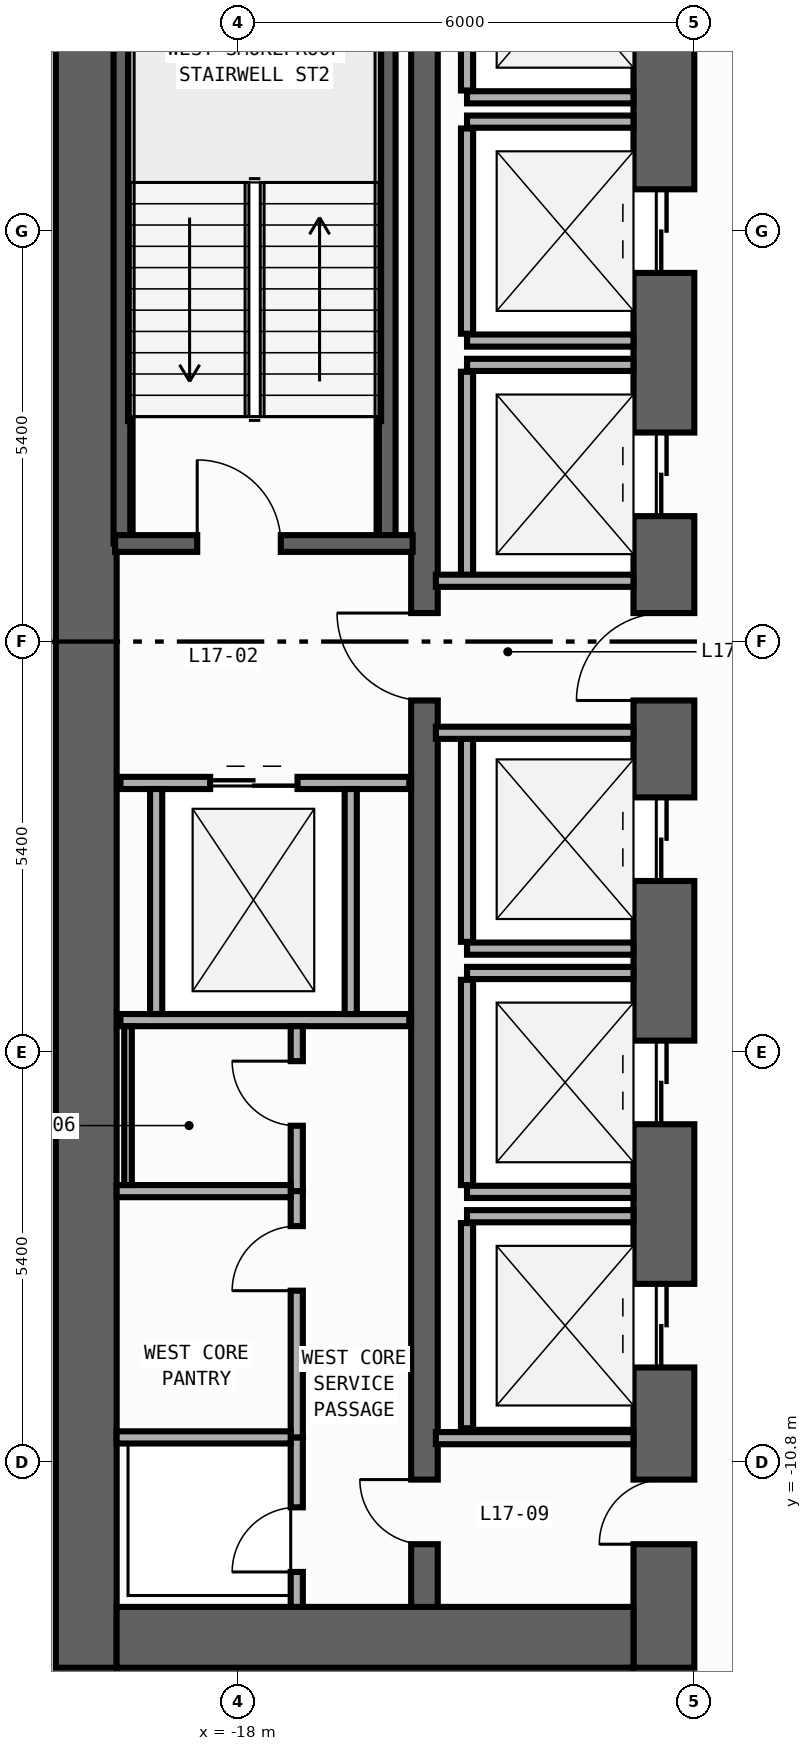
"""IFC4 building model, lengths in metres.
Left out: names, types, materials, properties, quantities, classifications, styles, units other than length and angle.
Written with IfcOpenShell. Run it as: python <this file> out.ifc"""

import sys

from ifc_helpers import new_model, si_unit, direction, frame, frame_2d, origin, place, context, subcontext, project, spatial, rectangle, extrude, element, fill, save


model = new_model("IFC4")
c1 = context("Model", 3, precision=1e-05, world=origin(), true_north=direction((0.0, 1.0)))
c2 = subcontext(c1, "Body", "Model", "MODEL_VIEW")
j1 = project(units=[si_unit("LENGTHUNIT", "METRE"), si_unit("PLANEANGLEUNIT", "RADIAN")], contexts=[c1])
p1 = place(None, origin())
s1 = spatial("IfcSite", under=j1, at=p1, CompositionType="ELEMENT")
p2 = place(p1, origin())
s2 = spatial("IfcBuilding", under=s1, at=p2, CompositionType="ELEMENT")
p3 = place(p2, frame((0.0, 0.0, 72.2)))
s3 = spatial("IfcBuildingStorey", under=s2, at=p3, CompositionType="ELEMENT", Elevation=72.2)
p4 = place(p3, frame((-20.0, -13.5, 0.0), z_axis=(0.0, 0.0, 1.0), x_axis=(0.0, 1.0, 0.0)))
e1 = element("IfcWall", 1, at=p4, inside=s3, PredefinedType="SHEAR", context=c2, shape_type="SweptSolid", body=[
    extrude(rectangle(XDim=27.0, YDim=0.8, at=frame_2d((13.5, 0.0))), origin(), (0.0, 0.0, 1.0), 3.94),
])
p5 = place(p3, frame((-12.4, -13.5, 0.0), z_axis=(0.0, 0.0, 1.0), x_axis=(0.0, 1.0, 0.0)))
e2 = element("IfcWall", 2, at=p5, inside=s3, PredefinedType="SHEAR", context=c2, shape_type="SweptSolid", body=[
    extrude(rectangle(XDim=27.0, YDim=0.8, at=frame_2d((13.5, 0.0))), origin(), (0.0, 0.0, 1.0), 3.94),
])
p6 = place(p5, frame((21.55, 0.0, 0.0)))
e3 = element("IfcOpeningElement", 3, at=p6, cuts=e2, PredefinedType="OPENING", context=c2, shape_type="SweptSolid", body=[
    extrude(rectangle(XDim=1.1, YDim=2.2, at=frame_2d((0.55, 1.1))), frame((0.0, 0.41, 0.0), z_axis=(0.0, -1.0, 0.0), x_axis=(1.0, 0.0, 0.0)), (0.0, 0.0, 1.0), 0.82),
])
p7 = place(p5, frame((18.35, 0.0, 0.0)))
e4 = element("IfcOpeningElement", 4, at=p7, cuts=e2, PredefinedType="OPENING", context=c2, shape_type="SweptSolid", body=[
    extrude(rectangle(XDim=1.1, YDim=2.2, at=frame_2d((0.55, 1.1))), frame((0.0, 0.41, 0.0), z_axis=(0.0, -1.0, 0.0), x_axis=(1.0, 0.0, 0.0)), (0.0, 0.0, 1.0), 0.82),
])
p8 = place(p5, frame((15.15, 0.0, 0.0)))
e5 = element("IfcOpeningElement", 5, at=p8, cuts=e2, PredefinedType="OPENING", context=c2, shape_type="SweptSolid", body=[
    extrude(rectangle(XDim=1.1, YDim=2.2, at=frame_2d((0.55, 1.1))), frame((0.0, 0.41, 0.0), z_axis=(0.0, -1.0, 0.0), x_axis=(1.0, 0.0, 0.0)), (0.0, 0.0, 1.0), 0.82),
])
p9 = place(p5, frame((10.35, 0.0, 0.0)))
e6 = element("IfcOpeningElement", 6, at=p9, cuts=e2, PredefinedType="OPENING", context=c2, shape_type="SweptSolid", body=[
    extrude(rectangle(XDim=1.1, YDim=2.2, at=frame_2d((0.55, 1.1))), frame((0.0, 0.41, 0.0), z_axis=(0.0, -1.0, 0.0), x_axis=(1.0, 0.0, 0.0)), (0.0, 0.0, 1.0), 0.82),
])
p10 = place(p5, frame((7.15, 0.0, 0.0)))
e7 = element("IfcOpeningElement", 7, at=p10, cuts=e2, PredefinedType="OPENING", context=c2, shape_type="SweptSolid", body=[
    extrude(rectangle(XDim=1.1, YDim=2.2, at=frame_2d((0.55, 1.1))), frame((0.0, 0.41, 0.0), z_axis=(0.0, -1.0, 0.0), x_axis=(1.0, 0.0, 0.0)), (0.0, 0.0, 1.0), 0.82),
])
p11 = place(p5, frame((3.95, 0.0, 0.0)))
e8 = element("IfcOpeningElement", 8, at=p11, cuts=e2, PredefinedType="OPENING", context=c2, shape_type="SweptSolid", body=[
    extrude(rectangle(XDim=1.1, YDim=2.2, at=frame_2d((0.55, 1.1))), frame((0.0, 0.41, 0.0), z_axis=(0.0, -1.0, 0.0), x_axis=(1.0, 0.0, 0.0)), (0.0, 0.0, 1.0), 0.82),
])
p12 = place(p5, frame((12.725, 0.0, 0.0)))
e9 = element("IfcOpeningElement", 9, at=p12, cuts=e2, PredefinedType="OPENING", context=c2, shape_type="SweptSolid", body=[
    extrude(rectangle(XDim=1.15, YDim=2.2, at=frame_2d((0.575, 1.1))), frame((0.0, 0.41, 0.0), z_axis=(0.0, -1.0, 0.0), x_axis=(1.0, 0.0, 0.0)), (0.0, 0.0, 1.0), 0.82),
])
p13 = place(p5, frame((1.625, 0.0, 0.0)))
e10 = element("IfcOpeningElement", 10, at=p13, cuts=e2, PredefinedType="OPENING", context=c2, shape_type="SweptSolid", body=[
    extrude(rectangle(XDim=0.85, YDim=2.1, at=frame_2d((0.425, 1.05))), frame((0.0, 0.41, 0.0), z_axis=(0.0, -1.0, 0.0), x_axis=(1.0, 0.0, 0.0)), (0.0, 0.0, 1.0), 0.82),
])
p14 = place(p3, frame((-19.6, -13.1, 0.0), z_axis=(0.0, 0.0, 1.0), x_axis=(1.0, 0.0, 0.0)))
e11 = element("IfcWall", 11, at=p14, inside=s3, PredefinedType="SHEAR", context=c2, shape_type="SweptSolid", body=[
    extrude(rectangle(XDim=6.8, YDim=0.8, at=frame_2d((3.4, 0.0))), origin(), (0.0, 0.0, 1.0), 3.94),
])
p15 = place(p3, frame((-15.55, -12.7, 0.0), z_axis=(0.0, 0.0, 1.0), x_axis=(0.0, 1.0, 0.0)))
e12 = element("IfcWall", 12, at=p15, inside=s3, PredefinedType="SHEAR", context=c2, shape_type="SweptSolid", body=[
    extrude(rectangle(XDim=25.4, YDim=0.35, at=frame_2d((12.7, 0.0))), origin(), (0.0, 0.0, 1.0), 3.94),
])
p16 = place(p15, frame((11.925, 0.0, 0.0)))
e13 = element("IfcOpeningElement", 13, at=p16, cuts=e12, PredefinedType="OPENING", context=c2, shape_type="SweptSolid", body=[
    extrude(rectangle(XDim=1.15, YDim=2.2, at=frame_2d((0.575, 1.1))), frame((0.0, 0.185, 0.0), z_axis=(0.0, -1.0, 0.0), x_axis=(1.0, 0.0, 0.0)), (0.0, 0.0, 1.0), 0.37),
])
p17 = place(p15, frame((0.825, 0.0, 0.0)))
e14 = element("IfcOpeningElement", 14, at=p17, cuts=e12, PredefinedType="OPENING", context=c2, shape_type="SweptSolid", body=[
    extrude(rectangle(XDim=0.85, YDim=2.1, at=frame_2d((0.425, 1.05))), frame((0.0, 0.185, 0.0), z_axis=(0.0, -1.0, 0.0), x_axis=(1.0, 0.0, 0.0)), (0.0, 0.0, 1.0), 0.37),
])
for number, where, z_axis, x_axis in (
    (15, (-16.04, 1.29, 0.0), (0.0, 0.0, 1.0), (0.0, 1.0, 0.0)),
    (16, (-19.53, 1.29, 0.0), (0.0, 0.0, 1.0), (0.0, 1.0, 0.0)),
):
    element("IfcWall", number, at=place(p3, frame(where, z_axis=z_axis, x_axis=x_axis)), inside=s3, PredefinedType="SHEAR", context=c2, shape_type="SweptSolid", body=[
        extrude(rectangle(XDim=11.3, YDim=0.22, at=frame_2d((5.65, 0.0))), origin(), (0.0, 0.0, 1.0), 3.94),
    ])
p18 = place(p3, frame((-19.62, 1.29, 0.0), z_axis=(0.0, 0.0, 1.0), x_axis=(1.0, 0.0, 0.0)))
e17 = element("IfcWall", 17, at=p18, inside=s3, PredefinedType="SHEAR", context=c2, shape_type="SweptSolid", body=[
    extrude(rectangle(XDim=3.915, YDim=0.22, at=frame_2d((1.958, 0.0))), origin(), (0.0, 0.0, 1.0), 3.94),
])
p19 = place(p18, frame((1.08, 0.0, 0.0)))
e18 = element("IfcOpeningElement", 18, at=p19, cuts=e17, PredefinedType="OPENING", context=c2, shape_type="SweptSolid", body=[
    extrude(rectangle(XDim=1.1, YDim=2.2, at=frame_2d((0.55, 1.1))), frame((0.0, 0.12, 0.0), z_axis=(0.0, -1.0, 0.0), x_axis=(1.0, 0.0, 0.0)), (0.0, 0.0, 1.0), 0.24),
])
p20 = place(p3, frame((-14.99, 7.16, 0.0), z_axis=(0.0, 0.0, 1.0), x_axis=(1.0, 0.0, 0.0)))
e19 = element("IfcWall", 19, at=p20, inside=s3, PredefinedType="STANDARD", context=c2, shape_type="SweptSolid", body=[
    extrude(rectangle(XDim=2.19, YDim=0.16, at=frame_2d((1.095, 0.0))), origin(), (0.0, 0.0, 1.0), 3.94),
])
p21 = place(p3, frame((-14.99, 7.25, 0.0), z_axis=(0.0, 0.0, 1.0), x_axis=(0.0, 1.0, 0.0)))
e20 = element("IfcWall", 20, at=p21, inside=s3, PredefinedType="STANDARD", context=c2, shape_type="SweptSolid", body=[
    extrude(rectangle(XDim=2.7, YDim=0.16, at=frame_2d((1.35, 0.0))), origin(), (0.0, 0.0, 1.0), 3.94),
])
for number, where, z_axis, x_axis in (
    (21, (-14.99, 3.96, 0.0), (0.0, 0.0, 1.0), (1.0, 0.0, 0.0)),
    (22, (-14.99, 6.84, 0.0), (0.0, 0.0, 1.0), (1.0, 0.0, 0.0)),
):
    element("IfcWall", number, at=place(p3, frame(where, z_axis=z_axis, x_axis=x_axis)), inside=s3, PredefinedType="STANDARD", context=c2, shape_type="SweptSolid", body=[
        extrude(rectangle(XDim=2.19, YDim=0.16, at=frame_2d((1.095, 0.0))), origin(), (0.0, 0.0, 1.0), 3.94),
    ])
p22 = place(p3, frame((-14.99, 4.05, 0.0), z_axis=(0.0, 0.0, 1.0), x_axis=(0.0, 1.0, 0.0)))
e23 = element("IfcWall", 23, at=p22, inside=s3, PredefinedType="STANDARD", context=c2, shape_type="SweptSolid", body=[
    extrude(rectangle(XDim=2.7, YDim=0.16, at=frame_2d((1.35, 0.0))), origin(), (0.0, 0.0, 1.0), 3.94),
])
p23 = place(p3, frame((-14.99, 3.64, 0.0), z_axis=(0.0, 0.0, 1.0), x_axis=(1.0, 0.0, 0.0)))
e24 = element("IfcWall", 24, at=p23, inside=s3, PredefinedType="STANDARD", context=c2, shape_type="SweptSolid", body=[
    extrude(rectangle(XDim=2.19, YDim=0.16, at=frame_2d((1.095, 0.0))), origin(), (0.0, 0.0, 1.0), 3.94),
])
p24 = place(p3, frame((-14.99, 0.85, 0.0), z_axis=(0.0, 0.0, 1.0), x_axis=(0.0, 1.0, 0.0)))
e25 = element("IfcWall", 25, at=p24, inside=s3, PredefinedType="STANDARD", context=c2, shape_type="SweptSolid", body=[
    extrude(rectangle(XDim=2.7, YDim=0.16, at=frame_2d((1.35, 0.0))), origin(), (0.0, 0.0, 1.0), 3.94),
])
p25 = place(p3, frame((-14.99, -4.04, 0.0), z_axis=(0.0, 0.0, 1.0), x_axis=(1.0, 0.0, 0.0)))
e26 = element("IfcWall", 26, at=p25, inside=s3, PredefinedType="STANDARD", context=c2, shape_type="SweptSolid", body=[
    extrude(rectangle(XDim=2.19, YDim=0.16, at=frame_2d((1.095, 0.0))), origin(), (0.0, 0.0, 1.0), 3.94),
])
p26 = place(p3, frame((-14.99, -3.95, 0.0), z_axis=(0.0, 0.0, 1.0), x_axis=(0.0, 1.0, 0.0)))
e27 = element("IfcWall", 27, at=p26, inside=s3, PredefinedType="STANDARD", context=c2, shape_type="SweptSolid", body=[
    extrude(rectangle(XDim=2.7, YDim=0.16, at=frame_2d((1.35, 0.0))), origin(), (0.0, 0.0, 1.0), 3.94),
])
for number, where, z_axis, x_axis in (
    (28, (-14.99, -7.24, 0.0), (0.0, 0.0, 1.0), (1.0, 0.0, 0.0)),
    (29, (-14.99, -4.36, 0.0), (0.0, 0.0, 1.0), (1.0, 0.0, 0.0)),
):
    element("IfcWall", number, at=place(p3, frame(where, z_axis=z_axis, x_axis=x_axis)), inside=s3, PredefinedType="STANDARD", context=c2, shape_type="SweptSolid", body=[
        extrude(rectangle(XDim=2.19, YDim=0.16, at=frame_2d((1.095, 0.0))), origin(), (0.0, 0.0, 1.0), 3.94),
    ])
p27 = place(p3, frame((-14.99, -7.15, 0.0), z_axis=(0.0, 0.0, 1.0), x_axis=(0.0, 1.0, 0.0)))
e30 = element("IfcWall", 30, at=p27, inside=s3, PredefinedType="STANDARD", context=c2, shape_type="SweptSolid", body=[
    extrude(rectangle(XDim=2.7, YDim=0.16, at=frame_2d((1.35, 0.0))), origin(), (0.0, 0.0, 1.0), 3.94),
])
p28 = place(p3, frame((-14.99, -7.56, 0.0), z_axis=(0.0, 0.0, 1.0), x_axis=(1.0, 0.0, 0.0)))
e31 = element("IfcWall", 31, at=p28, inside=s3, PredefinedType="STANDARD", context=c2, shape_type="SweptSolid", body=[
    extrude(rectangle(XDim=2.19, YDim=0.16, at=frame_2d((1.095, 0.0))), origin(), (0.0, 0.0, 1.0), 3.94),
])
p29 = place(p3, frame((-14.99, -10.35, 0.0), z_axis=(0.0, 0.0, 1.0), x_axis=(0.0, 1.0, 0.0)))
e32 = element("IfcWall", 32, at=p29, inside=s3, PredefinedType="STANDARD", context=c2, shape_type="SweptSolid", body=[
    extrude(rectangle(XDim=2.7, YDim=0.16, at=frame_2d((1.35, 0.0))), origin(), (0.0, 0.0, 1.0), 3.94),
])
p30 = place(p3, frame((-19.55, -1.86, 0.0), z_axis=(0.0, 0.0, 1.0), x_axis=(1.0, 0.0, 0.0)))
e33 = element("IfcWall", 33, at=p30, inside=s3, PredefinedType="STANDARD", context=c2, shape_type="SweptSolid", body=[
    extrude(rectangle(XDim=3.8, YDim=0.16, at=frame_2d((1.9, 0.0))), origin(), (0.0, 0.0, 1.0), 3.94),
])
p31 = place(p30, frame((1.18, 0.0, 0.0)))
e34 = element("IfcOpeningElement", 34, at=p31, cuts=e33, PredefinedType="OPENING", context=c2, shape_type="SweptSolid", body=[
    extrude(rectangle(XDim=1.15, YDim=2.2, at=frame_2d((0.575, 1.1))), frame((0.0, 0.09, 0.0), z_axis=(0.0, -1.0, 0.0), x_axis=(1.0, 0.0, 0.0)), (0.0, 0.0, 1.0), 0.18),
])
p32 = place(p3, frame((-19.55, -4.98, 0.0), z_axis=(0.0, 0.0, 1.0), x_axis=(1.0, 0.0, 0.0)))
e35 = element("IfcWall", 35, at=p32, inside=s3, PredefinedType="STANDARD", context=c2, shape_type="SweptSolid", body=[
    extrude(rectangle(XDim=3.8, YDim=0.16, at=frame_2d((1.9, 0.0))), origin(), (0.0, 0.0, 1.0), 3.94),
])
for number, where, z_axis, x_axis in (
    (36, (-19.08, -4.9, 0.0), (0.0, 0.0, 1.0), (0.0, 1.0, 0.0)),
    (37, (-16.52, -4.9, 0.0), (0.0, 0.0, 1.0), (0.0, 1.0, 0.0)),
):
    element("IfcWall", number, at=place(p3, frame(where, z_axis=z_axis, x_axis=x_axis)), inside=s3, PredefinedType="STANDARD", context=c2, shape_type="SweptSolid", body=[
        extrude(rectangle(XDim=2.96, YDim=0.16, at=frame_2d((1.48, 0.0))), origin(), (0.0, 0.0, 1.0), 3.94),
    ])
for number, where, z_axis, x_axis in (
    (38, (-15.4, 0.8, 0.0), (0.0, 0.0, 1.0), (1.0, 0.0, 0.0)),
    (39, (-15.4, -1.2, 0.0), (0.0, 0.0, 1.0), (1.0, 0.0, 0.0)),
    (40, (-15.4, -10.48, 0.0), (0.0, 0.0, 1.0), (1.0, 0.0, 0.0)),
):
    element("IfcWall", number, at=place(p3, frame(where, z_axis=z_axis, x_axis=x_axis)), inside=s3, PredefinedType="STANDARD", context=c2, shape_type="SweptSolid", body=[
        extrude(rectangle(XDim=2.6, YDim=0.16, at=frame_2d((1.3, 0.0))), origin(), (0.0, 0.0, 1.0), 3.94),
    ])
p33 = place(p3, frame((-17.23, -12.7, 0.0), z_axis=(0.0, 0.0, 1.0), x_axis=(0.0, 1.0, 0.0)))
e41 = element("IfcWall", 41, at=p33, inside=s3, PredefinedType="PARTITIONING", context=c2, shape_type="SweptSolid", body=[
    extrude(rectangle(XDim=2.23, YDim=0.16, at=frame_2d((1.115, 0.0))), origin(), (0.0, 0.0, 1.0), 3.94),
])
p34 = place(p33, frame((0.46, 0.0, 0.0)))
e42 = element("IfcOpeningElement", 42, at=p34, cuts=e41, PredefinedType="OPENING", context=c2, shape_type="SweptSolid", body=[
    extrude(rectangle(XDim=0.85, YDim=2.1, at=frame_2d((0.425, 1.05))), frame((0.0, 0.09, 0.0), z_axis=(0.0, -1.0, 0.0), x_axis=(1.0, 0.0, 0.0)), (0.0, 0.0, 1.0), 0.18),
])
p35 = place(p3, frame((-17.23, -7.23, 0.0), z_axis=(0.0, 0.0, 1.0), x_axis=(0.0, 1.0, 0.0)))
e43 = element("IfcWall", 43, at=p35, inside=s3, PredefinedType="PARTITIONING", context=c2, shape_type="SweptSolid", body=[
    extrude(rectangle(XDim=2.17, YDim=0.16, at=frame_2d((1.085, 0.0))), origin(), (0.0, 0.0, 1.0), 3.94),
])
p36 = place(p35, frame((0.86, 0.0, 0.0)))
e44 = element("IfcOpeningElement", 44, at=p36, cuts=e43, PredefinedType="OPENING", context=c2, shape_type="SweptSolid", body=[
    extrude(rectangle(XDim=0.85, YDim=2.1, at=frame_2d((0.425, 1.05))), frame((0.0, 0.09, 0.0), z_axis=(0.0, -1.0, 0.0), x_axis=(1.0, 0.0, 0.0)), (0.0, 0.0, 1.0), 0.18),
])
p37 = place(p3, frame((-17.23, -10.47, 0.0), z_axis=(0.0, 0.0, 1.0), x_axis=(0.0, 1.0, 0.0)))
e45 = element("IfcWall", 45, at=p37, inside=s3, PredefinedType="PARTITIONING", context=c2, shape_type="SweptSolid", body=[
    extrude(rectangle(XDim=3.24, YDim=0.16, at=frame_2d((1.62, 0.0))), origin(), (0.0, 0.0, 1.0), 3.94),
])
p38 = place(p37, frame((1.93, 0.0, 0.0)))
e46 = element("IfcOpeningElement", 46, at=p38, cuts=e45, PredefinedType="OPENING", context=c2, shape_type="SweptSolid", body=[
    extrude(rectangle(XDim=0.85, YDim=2.1, at=frame_2d((0.425, 1.05))), frame((0.0, 0.09, 0.0), z_axis=(0.0, -1.0, 0.0), x_axis=(1.0, 0.0, 0.0)), (0.0, 0.0, 1.0), 0.18),
])
for number, where, z_axis, x_axis in (
    (47, (-19.6, -10.47, 0.0), (0.0, 0.0, 1.0), (1.0, 0.0, 0.0)),
    (48, (-19.6, -7.23, 0.0), (0.0, 0.0, 1.0), (1.0, 0.0, 0.0)),
):
    element("IfcWall", number, at=place(p3, frame(where, z_axis=z_axis, x_axis=x_axis)), inside=s3, PredefinedType="PARTITIONING", context=c2, shape_type="SweptSolid", body=[
        extrude(rectangle(XDim=2.29, YDim=0.16, at=frame_2d((1.145, 0.0))), origin(), (0.0, 0.0, 1.0), 3.94),
    ])
p39 = place(p3, frame((-19.45, -7.15, 0.0), z_axis=(0.0, 0.0, 1.0), x_axis=(0.0, 1.0, 0.0)))
e49 = element("IfcWall", 49, at=p39, inside=s3, PredefinedType="PARTITIONING", context=c2, shape_type="SweptSolid", body=[
    extrude(rectangle(XDim=2.09, YDim=0.1, at=frame_2d((1.045, 0.0))), origin(), (0.0, 0.0, 1.0), 3.94),
])
p40 = place(p19, origin())
e50 = element("IfcDoor", 50, at=p40, inside=s3, OperationType="SINGLE_SWING_LEFT", PredefinedType="DOOR", context=c2, shape_type="SweptSolid", body=[
    extrude(rectangle(XDim=1.1, YDim=2.2, at=frame_2d((0.55, 1.1))), frame((0.0, 0.025, 0.0), z_axis=(0.0, -1.0, 0.0), x_axis=(1.0, 0.0, 0.0)), (0.0, 0.0, 1.0), 0.05),
])
fill(e18, e50)
p41 = place(p7, origin())
e51 = element("IfcDoor", 51, at=p41, inside=s3, OperationType="DOUBLE_DOOR_SLIDING", PredefinedType="DOOR", context=c2, shape_type="SweptSolid", body=[
    extrude(rectangle(XDim=1.1, YDim=2.2, at=frame_2d((0.55, 1.1))), frame((0.0, 0.025, 0.0), z_axis=(0.0, -1.0, 0.0), x_axis=(1.0, 0.0, 0.0)), (0.0, 0.0, 1.0), 0.05),
])
fill(e4, e51)
p42 = place(p8, origin())
e52 = element("IfcDoor", 52, at=p42, inside=s3, OperationType="DOUBLE_DOOR_SLIDING", PredefinedType="DOOR", context=c2, shape_type="SweptSolid", body=[
    extrude(rectangle(XDim=1.1, YDim=2.2, at=frame_2d((0.55, 1.1))), frame((0.0, 0.025, 0.0), z_axis=(0.0, -1.0, 0.0), x_axis=(1.0, 0.0, 0.0)), (0.0, 0.0, 1.0), 0.05),
])
fill(e5, e52)
p43 = place(p9, origin())
e53 = element("IfcDoor", 53, at=p43, inside=s3, OperationType="DOUBLE_DOOR_SLIDING", PredefinedType="DOOR", context=c2, shape_type="SweptSolid", body=[
    extrude(rectangle(XDim=1.1, YDim=2.2, at=frame_2d((0.55, 1.1))), frame((0.0, 0.025, 0.0), z_axis=(0.0, -1.0, 0.0), x_axis=(1.0, 0.0, 0.0)), (0.0, 0.0, 1.0), 0.05),
])
fill(e6, e53)
p44 = place(p10, origin())
e54 = element("IfcDoor", 54, at=p44, inside=s3, OperationType="DOUBLE_DOOR_SLIDING", PredefinedType="DOOR", context=c2, shape_type="SweptSolid", body=[
    extrude(rectangle(XDim=1.1, YDim=2.2, at=frame_2d((0.55, 1.1))), frame((0.0, 0.025, 0.0), z_axis=(0.0, -1.0, 0.0), x_axis=(1.0, 0.0, 0.0)), (0.0, 0.0, 1.0), 0.05),
])
fill(e7, e54)
p45 = place(p11, origin())
e55 = element("IfcDoor", 55, at=p45, inside=s3, OperationType="DOUBLE_DOOR_SLIDING", PredefinedType="DOOR", context=c2, shape_type="SweptSolid", body=[
    extrude(rectangle(XDim=1.1, YDim=2.2, at=frame_2d((0.55, 1.1))), frame((0.0, 0.025, 0.0), z_axis=(0.0, -1.0, 0.0), x_axis=(1.0, 0.0, 0.0)), (0.0, 0.0, 1.0), 0.05),
])
fill(e8, e55)
p46 = place(p12, origin())
e56 = element("IfcDoor", 56, at=p46, inside=s3, OperationType="SINGLE_SWING_LEFT", PredefinedType="DOOR", context=c2, shape_type="SweptSolid", body=[
    extrude(rectangle(XDim=1.15, YDim=2.2, at=frame_2d((0.575, 1.1))), frame((0.0, 0.025, 0.0), z_axis=(0.0, -1.0, 0.0), x_axis=(1.0, 0.0, 0.0)), (0.0, 0.0, 1.0), 0.05),
])
fill(e9, e56)
p47 = place(p16, origin())
e57 = element("IfcDoor", 57, at=p47, inside=s3, OperationType="SINGLE_SWING_RIGHT", PredefinedType="DOOR", context=c2, shape_type="SweptSolid", body=[
    extrude(rectangle(XDim=1.15, YDim=2.2, at=frame_2d((0.575, 1.1))), frame((0.0, 0.025, 0.0), z_axis=(0.0, -1.0, 0.0), x_axis=(1.0, 0.0, 0.0)), (0.0, 0.0, 1.0), 0.05),
])
fill(e13, e57)
p48 = place(p13, origin())
e58 = element("IfcDoor", 58, at=p48, inside=s3, OperationType="SINGLE_SWING_LEFT", PredefinedType="DOOR", context=c2, shape_type="SweptSolid", body=[
    extrude(rectangle(XDim=0.85, YDim=2.1, at=frame_2d((0.425, 1.05))), frame((0.0, 0.025, 0.0), z_axis=(0.0, -1.0, 0.0), x_axis=(1.0, 0.0, 0.0)), (0.0, 0.0, 1.0), 0.05),
])
fill(e10, e58)
p49 = place(p17, origin())
e59 = element("IfcDoor", 59, at=p49, inside=s3, OperationType="SINGLE_SWING_RIGHT", PredefinedType="DOOR", context=c2, shape_type="SweptSolid", body=[
    extrude(rectangle(XDim=0.85, YDim=2.1, at=frame_2d((0.425, 1.05))), frame((0.0, 0.025, 0.0), z_axis=(0.0, -1.0, 0.0), x_axis=(1.0, 0.0, 0.0)), (0.0, 0.0, 1.0), 0.05),
])
fill(e14, e59)
p50 = place(p31, origin())
e60 = element("IfcDoor", 60, at=p50, inside=s3, OperationType="DOUBLE_DOOR_SLIDING", PredefinedType="DOOR", context=c2, shape_type="SweptSolid", body=[
    extrude(rectangle(XDim=1.15, YDim=2.2, at=frame_2d((0.575, 1.1))), frame((0.0, 0.025, 0.0), z_axis=(0.0, -1.0, 0.0), x_axis=(1.0, 0.0, 0.0)), (0.0, 0.0, 1.0), 0.05),
])
fill(e34, e60)
p51 = place(p34, origin())
e61 = element("IfcDoor", 61, at=p51, inside=s3, OperationType="SINGLE_SWING_LEFT", PredefinedType="DOOR", context=c2, shape_type="SweptSolid", body=[
    extrude(rectangle(XDim=0.85, YDim=2.1, at=frame_2d((0.425, 1.05))), frame((0.0, 0.025, 0.0), z_axis=(0.0, -1.0, 0.0), x_axis=(1.0, 0.0, 0.0)), (0.0, 0.0, 1.0), 0.05),
])
fill(e42, e61)
p52 = place(p36, origin())
e62 = element("IfcDoor", 62, at=p52, inside=s3, OperationType="SINGLE_SWING_RIGHT", PredefinedType="DOOR", context=c2, shape_type="SweptSolid", body=[
    extrude(rectangle(XDim=0.85, YDim=2.1, at=frame_2d((0.425, 1.05))), frame((0.0, 0.025, 0.0), z_axis=(0.0, -1.0, 0.0), x_axis=(1.0, 0.0, 0.0)), (0.0, 0.0, 1.0), 0.05),
])
fill(e44, e62)
p53 = place(p38, origin())
e63 = element("IfcDoor", 63, at=p53, inside=s3, OperationType="SINGLE_SWING_LEFT", PredefinedType="DOOR", context=c2, shape_type="SweptSolid", body=[
    extrude(rectangle(XDim=0.85, YDim=2.1, at=frame_2d((0.425, 1.05))), frame((0.0, 0.025, 0.0), z_axis=(0.0, -1.0, 0.0), x_axis=(1.0, 0.0, 0.0)), (0.0, 0.0, 1.0), 0.05),
])
fill(e46, e63)
save(model, sys.argv[1])
